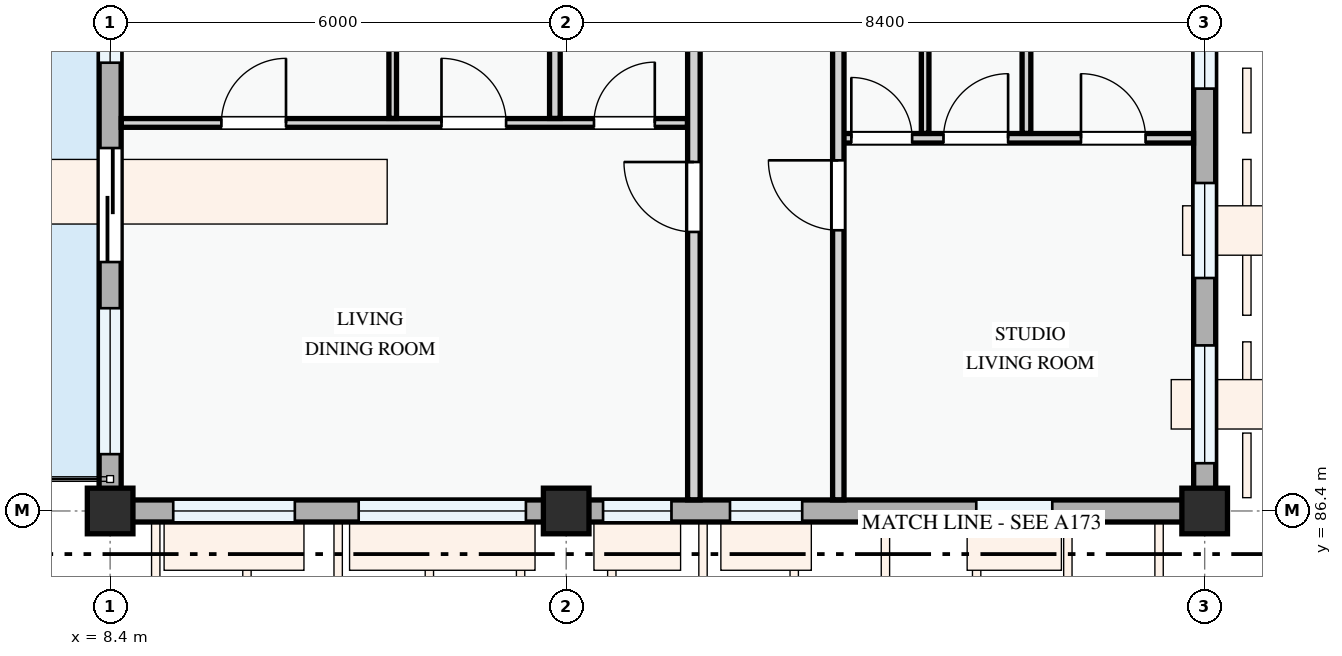
"""IFC4 building model, lengths in metres.
Left out: names, types, materials, properties, quantities, classifications, styles, units other than length and angle.
Written with IfcOpenShell. Run it as: python <this file> out.ifc"""

import sys

from ifc_helpers import new_model, si_unit, direction, frame, frame_2d, origin, origin_2d, place, context, subcontext, project, spatial, rectangle, extrude, element, fill, save


model = new_model("IFC4")
c1 = context("Model", 3, precision=1e-05, world=origin(), true_north=direction((0.0, 1.0)))
c2 = subcontext(c1, "Body", "Model", "MODEL_VIEW")
j1 = project(units=[si_unit("LENGTHUNIT", "METRE"), si_unit("PLANEANGLEUNIT", "RADIAN")], contexts=[c1])
p1 = place(None, origin())
s1 = spatial("IfcSite", under=j1, at=p1, CompositionType="ELEMENT")
p2 = place(p1, origin())
s2 = spatial("IfcBuilding", under=s1, at=p2, CompositionType="ELEMENT")
p3 = place(p2, frame((0.0, 0.0, 27.9)))
s3 = spatial("IfcBuildingStorey", under=s2, at=p3, CompositionType="ELEMENT", Elevation=27.9)
for number, where, z_axis, x_axis in (
    (1, (8.4, 86.4, 0.0), (0.0, 0.0, 1.0), (1.0, 0.0, 0.0)),
    (2, (14.4, 86.4, 0.0), (0.0, 0.0, 1.0), (1.0, 0.0, 0.0)),
    (3, (22.8, 86.4, 0.0), (0.0, 0.0, 1.0), (1.0, 0.0, 0.0)),
):
    element("IfcColumn", number, at=place(p3, frame(where, z_axis=z_axis, x_axis=x_axis)), inside=s3, PredefinedType="COLUMN", context=c2, shape_type="SweptSolid", body=[
        extrude(rectangle(XDim=0.6, YDim=0.6, at=origin_2d()), origin(), (0.0, 0.0, 1.0), 3.3),
    ])
p4 = place(p3, frame((8.4, 94.8, 0.0), z_axis=(0.0, 0.0, 1.0), x_axis=(0.0, -1.0, 0.0)))
e4 = element("IfcWall", 4, at=p4, inside=s3, PredefinedType="STANDARD", context=c2, shape_type="SweptSolid", body=[
    extrude(rectangle(XDim=8.4, YDim=0.29, at=frame_2d((4.2, 0.0))), origin(), (0.0, 0.0, 1.0), 2.345),
])
p5 = place(p4, frame((3.625, 0.0, 0.0)))
e5 = element("IfcOpeningElement", 5, at=p5, cuts=e4, PredefinedType="OPENING", context=c2, shape_type="SweptSolid", body=[
    extrude(rectangle(XDim=1.5, YDim=2.2, at=frame_2d((0.75, 1.1))), frame((0.0, 0.155, 0.0), z_axis=(0.0, -1.0, 0.0), x_axis=(1.0, 0.0, 0.0)), (0.0, 0.0, 1.0), 0.31),
])
p6 = place(p4, frame((0.982, 0.0, 0.78)))
e6 = element("IfcOpeningElement", 6, at=p6, cuts=e4, PredefinedType="OPENING", context=c2, shape_type="SweptSolid", body=[
    extrude(rectangle(XDim=1.52, YDim=1.42, at=frame_2d((0.76, 0.71))), frame((0.0, 0.155, 0.0), z_axis=(0.0, -1.0, 0.0), x_axis=(1.0, 0.0, 0.0)), (0.0, 0.0, 1.0), 0.31),
])
p7 = place(p4, frame((5.732, 0.0, 0.78)))
e7 = element("IfcOpeningElement", 7, at=p7, cuts=e4, PredefinedType="OPENING", context=c2, shape_type="SweptSolid", body=[
    extrude(rectangle(XDim=1.92, YDim=1.44, at=frame_2d((0.96, 0.72))), frame((0.0, 0.155, 0.0), z_axis=(0.0, -1.0, 0.0), x_axis=(1.0, 0.0, 0.0)), (0.0, 0.0, 1.0), 0.31),
])
p8 = place(p3, frame((8.4, 86.4, 0.0), z_axis=(0.0, 0.0, 1.0), x_axis=(1.0, 0.0, 0.0)))
e8 = element("IfcWall", 8, at=p8, inside=s3, PredefinedType="STANDARD", context=c2, shape_type="SweptSolid", body=[
    extrude(rectangle(XDim=6.0, YDim=0.29, at=frame_2d((3.0, 0.0))), origin(), (0.0, 0.0, 1.0), 2.475),
])
p9 = place(p8, frame((0.83, 0.0, 0.78)))
e9 = element("IfcOpeningElement", 9, at=p9, cuts=e8, PredefinedType="OPENING", context=c2, shape_type="SweptSolid", body=[
    extrude(rectangle(XDim=1.6, YDim=1.55, at=frame_2d((0.8, 0.775))), frame((0.0, 0.155, 0.0), z_axis=(0.0, -1.0, 0.0), x_axis=(1.0, 0.0, 0.0)), (0.0, 0.0, 1.0), 0.31),
])
p10 = place(p8, frame((3.27, 0.0, 0.78)))
e10 = element("IfcOpeningElement", 10, at=p10, cuts=e8, PredefinedType="OPENING", context=c2, shape_type="SweptSolid", body=[
    extrude(rectangle(XDim=2.2, YDim=1.5, at=frame_2d((1.1, 0.75))), frame((0.0, 0.155, 0.0), z_axis=(0.0, -1.0, 0.0), x_axis=(1.0, 0.0, 0.0)), (0.0, 0.0, 1.0), 0.31),
])
p11 = place(p3, frame((14.4, 86.4, 0.0), z_axis=(0.0, 0.0, 1.0), x_axis=(1.0, 0.0, 0.0)))
e11 = element("IfcWall", 11, at=p11, inside=s3, PredefinedType="STANDARD", context=c2, shape_type="SweptSolid", body=[
    extrude(rectangle(XDim=8.4, YDim=0.29, at=frame_2d((4.2, 0.0))), origin(), (0.0, 0.0, 1.0), 2.375),
])
p12 = place(p11, frame((0.485, 0.0, 0.78)))
e12 = element("IfcOpeningElement", 12, at=p12, cuts=e11, PredefinedType="OPENING", context=c2, shape_type="SweptSolid", body=[
    extrude(rectangle(XDim=0.9, YDim=1.2, at=frame_2d((0.45, 0.6))), frame((0.0, 0.155, 0.0), z_axis=(0.0, -1.0, 0.0), x_axis=(1.0, 0.0, 0.0)), (0.0, 0.0, 1.0), 0.31),
])
p13 = place(p11, frame((2.155, 0.0, 0.78)))
e13 = element("IfcOpeningElement", 13, at=p13, cuts=e11, PredefinedType="OPENING", context=c2, shape_type="SweptSolid", body=[
    extrude(rectangle(XDim=0.95, YDim=1.15, at=frame_2d((0.475, 0.575))), frame((0.0, 0.155, 0.0), z_axis=(0.0, -1.0, 0.0), x_axis=(1.0, 0.0, 0.0)), (0.0, 0.0, 1.0), 0.31),
])
p14 = place(p11, frame((5.395, 0.0, 0.78)))
e14 = element("IfcOpeningElement", 14, at=p14, cuts=e11, PredefinedType="OPENING", context=c2, shape_type="SweptSolid", body=[
    extrude(rectangle(XDim=1.0, YDim=1.25, at=frame_2d((0.5, 0.625))), frame((0.0, 0.155, 0.0), z_axis=(0.0, -1.0, 0.0), x_axis=(1.0, 0.0, 0.0)), (0.0, 0.0, 1.0), 0.31),
])
p15 = place(p3, frame((22.8, 86.4, 0.0), z_axis=(0.0, 0.0, 1.0), x_axis=(0.0, 1.0, 0.0)))
e15 = element("IfcWall", 15, at=p15, inside=s3, PredefinedType="STANDARD", context=c2, shape_type="SweptSolid", body=[
    extrude(rectangle(XDim=8.4, YDim=0.29, at=frame_2d((4.2, 0.0))), origin(), (0.0, 0.0, 1.0), 2.425),
])
p16 = place(p15, frame((0.628, 0.0, 0.78)))
e16 = element("IfcOpeningElement", 16, at=p16, cuts=e15, PredefinedType="OPENING", context=c2, shape_type="SweptSolid", body=[
    extrude(rectangle(XDim=1.55, YDim=1.4, at=frame_2d((0.775, 0.7))), frame((0.0, 0.155, 0.0), z_axis=(0.0, -1.0, 0.0), x_axis=(1.0, 0.0, 0.0)), (0.0, 0.0, 1.0), 0.31),
])
p17 = place(p15, frame((3.065, 0.0, 0.78)))
e17 = element("IfcOpeningElement", 17, at=p17, cuts=e15, PredefinedType="OPENING", context=c2, shape_type="SweptSolid", body=[
    extrude(rectangle(XDim=1.25, YDim=1.3, at=frame_2d((0.625, 0.65))), frame((0.0, 0.155, 0.0), z_axis=(0.0, -1.0, 0.0), x_axis=(1.0, 0.0, 0.0)), (0.0, 0.0, 1.0), 0.31),
])
p18 = place(p15, frame((5.557, 0.0, 0.78)))
e18 = element("IfcOpeningElement", 18, at=p18, cuts=e15, PredefinedType="OPENING", context=c2, shape_type="SweptSolid", body=[
    extrude(rectangle(XDim=2.0, YDim=1.5, at=frame_2d((1.0, 0.75))), frame((0.0, 0.155, 0.0), z_axis=(0.0, -1.0, 0.0), x_axis=(1.0, 0.0, 0.0)), (0.0, 0.0, 1.0), 0.31),
])
p19 = place(p3, frame((8.547, 91.505, 0.0), z_axis=(0.0, 0.0, 1.0), x_axis=(1.0, 0.0, 0.0)))
e19 = element("IfcWall", 19, at=p19, inside=s3, PredefinedType="PARTITIONING", context=c2, shape_type="SweptSolid", body=[
    extrude(rectangle(XDim=7.448, YDim=0.115, at=frame_2d((3.724, 0.0))), origin(), (0.0, 0.0, 1.0), 3.0),
])
p20 = place(p19, frame((1.317, 0.0, 0.0)))
e20 = element("IfcOpeningElement", 20, at=p20, cuts=e19, PredefinedType="OPENING", context=c2, shape_type="SweptSolid", body=[
    extrude(rectangle(XDim=0.85, YDim=2.1, at=frame_2d((0.425, 1.05))), frame((0.0, 0.067, 0.0), z_axis=(0.0, -1.0, 0.0), x_axis=(1.0, 0.0, 0.0)), (0.0, 0.0, 1.0), 0.135),
])
p21 = place(p19, frame((4.212, 0.0, 0.0)))
e21 = element("IfcOpeningElement", 21, at=p21, cuts=e19, PredefinedType="OPENING", context=c2, shape_type="SweptSolid", body=[
    extrude(rectangle(XDim=0.85, YDim=2.1, at=frame_2d((0.425, 1.05))), frame((0.0, 0.067, 0.0), z_axis=(0.0, -1.0, 0.0), x_axis=(1.0, 0.0, 0.0)), (0.0, 0.0, 1.0), 0.135),
])
p22 = place(p19, frame((6.219, 0.0, 0.0)))
e22 = element("IfcOpeningElement", 22, at=p22, cuts=e19, PredefinedType="OPENING", context=c2, shape_type="SweptSolid", body=[
    extrude(rectangle(XDim=0.8, YDim=2.1, at=frame_2d((0.4, 1.05))), frame((0.0, 0.067, 0.0), z_axis=(0.0, -1.0, 0.0), x_axis=(1.0, 0.0, 0.0)), (0.0, 0.0, 1.0), 0.135),
])
p23 = place(p3, frame((12.118, 91.564, 0.0), z_axis=(0.0, 0.0, 1.0), x_axis=(0.0, 1.0, 0.0)))
e23 = element("IfcWall", 23, at=p23, inside=s3, PredefinedType="PARTITIONING", context=c2, shape_type="SweptSolid", body=[
    extrude(rectangle(XDim=4.891, YDim=0.1, at=frame_2d((2.446, 0.0))), origin(), (0.0, 0.0, 1.0), 3.0),
])
p24 = place(p3, frame((14.251, 91.564, 0.0), z_axis=(0.0, 0.0, 1.0), x_axis=(0.0, 1.0, 0.0)))
e24 = element("IfcWall", 24, at=p24, inside=s3, PredefinedType="PARTITIONING", context=c2, shape_type="SweptSolid", body=[
    extrude(rectangle(XDim=4.891, YDim=0.14, at=frame_2d((2.446, 0.0))), origin(), (0.0, 0.0, 1.0), 2.425),
])
p25 = place(p3, frame((17.98, 91.303, 0.0), z_axis=(0.0, 0.0, 1.0), x_axis=(1.0, 0.0, 0.0)))
e25 = element("IfcWall", 25, at=p25, inside=s3, PredefinedType="PARTITIONING", context=c2, shape_type="SweptSolid", body=[
    extrude(rectangle(XDim=4.673, YDim=0.125, at=frame_2d((2.336, 0.0))), origin(), (0.0, 0.0, 1.0), 3.0),
])
p26 = place(p25, frame((0.171, 0.0, 0.0)))
e26 = element("IfcOpeningElement", 26, at=p26, cuts=e25, PredefinedType="OPENING", context=c2, shape_type="SweptSolid", body=[
    extrude(rectangle(XDim=0.8, YDim=2.1, at=frame_2d((0.4, 1.05))), frame((0.0, 0.073, 0.0), z_axis=(0.0, -1.0, 0.0), x_axis=(1.0, 0.0, 0.0)), (0.0, 0.0, 1.0), 0.145),
])
p27 = place(p25, frame((1.384, 0.0, 0.0)))
e27 = element("IfcOpeningElement", 27, at=p27, cuts=e25, PredefinedType="OPENING", context=c2, shape_type="SweptSolid", body=[
    extrude(rectangle(XDim=0.85, YDim=2.1, at=frame_2d((0.425, 1.05))), frame((0.0, 0.073, 0.0), z_axis=(0.0, -1.0, 0.0), x_axis=(1.0, 0.0, 0.0)), (0.0, 0.0, 1.0), 0.145),
])
p28 = place(p25, frame((3.193, 0.0, 0.0)))
e28 = element("IfcOpeningElement", 28, at=p28, cuts=e25, PredefinedType="OPENING", context=c2, shape_type="SweptSolid", body=[
    extrude(rectangle(XDim=0.85, YDim=2.1, at=frame_2d((0.425, 1.05))), frame((0.0, 0.073, 0.0), z_axis=(0.0, -1.0, 0.0), x_axis=(1.0, 0.0, 0.0)), (0.0, 0.0, 1.0), 0.145),
])
p29 = place(p3, frame((20.455, 91.368, 0.0), z_axis=(0.0, 0.0, 1.0), x_axis=(0.0, 1.0, 0.0)))
e29 = element("IfcWall", 29, at=p29, inside=s3, PredefinedType="PARTITIONING", context=c2, shape_type="SweptSolid", body=[
    extrude(rectangle(XDim=5.08, YDim=0.115, at=frame_2d((2.54, 0.0))), origin(), (0.0, 0.0, 1.0), 3.0),
])
p30 = place(p3, frame((19.122, 91.368, 0.0), z_axis=(0.0, 0.0, 1.0), x_axis=(0.0, 1.0, 0.0)))
e30 = element("IfcWall", 30, at=p30, inside=s3, PredefinedType="PARTITIONING", context=c2, shape_type="SweptSolid", body=[
    extrude(rectangle(XDim=5.08, YDim=0.1, at=frame_2d((2.54, 0.0))), origin(), (0.0, 0.0, 1.0), 3.0),
])
p31 = place(p3, frame((16.08, 86.547, 0.0), z_axis=(0.0, 0.0, 1.0), x_axis=(0.0, 1.0, 0.0)))
e31 = element("IfcWall", 31, at=p31, inside=s3, PredefinedType="PARTITIONING", context=c2, shape_type="SweptSolid", body=[
    extrude(rectangle(XDim=22.793, YDim=0.165, at=frame_2d((11.396, 0.0))), origin(), (0.0, 0.0, 1.0), 3.0),
])
p32 = place(p31, frame((3.524, 0.0, 0.0)))
e32 = element("IfcOpeningElement", 32, at=p32, cuts=e31, PredefinedType="OPENING", context=c2, shape_type="SweptSolid", body=[
    extrude(rectangle(XDim=0.92, YDim=2.1, at=frame_2d((0.46, 1.05))), frame((0.0, 0.093, 0.0), z_axis=(0.0, -1.0, 0.0), x_axis=(1.0, 0.0, 0.0)), (0.0, 0.0, 1.0), 0.185),
])
p33 = place(p31, frame((10.716, 0.0, 0.0)))
e33 = element("IfcOpeningElement", 33, at=p33, cuts=e31, PredefinedType="OPENING", context=c2, shape_type="SweptSolid", body=[
    extrude(rectangle(XDim=0.92, YDim=2.1, at=frame_2d((0.46, 1.05))), frame((0.0, 0.093, 0.0), z_axis=(0.0, -1.0, 0.0), x_axis=(1.0, 0.0, 0.0)), (0.0, 0.0, 1.0), 0.185),
])
p34 = place(p3, frame((17.98, 86.547, 0.0), z_axis=(0.0, 0.0, 1.0), x_axis=(0.0, 1.0, 0.0)))
e34 = element("IfcWall", 34, at=p34, inside=s3, PredefinedType="PARTITIONING", context=c2, shape_type="SweptSolid", body=[
    extrude(rectangle(XDim=22.793, YDim=0.15, at=frame_2d((11.396, 0.0))), origin(), (0.0, 0.0, 1.0), 3.0),
])
p35 = place(p34, frame((3.546, 0.0, 0.0)))
e35 = element("IfcOpeningElement", 35, at=p35, cuts=e34, PredefinedType="OPENING", context=c2, shape_type="SweptSolid", body=[
    extrude(rectangle(XDim=0.92, YDim=2.1, at=frame_2d((0.46, 1.05))), frame((0.0, 0.085, 0.0), z_axis=(0.0, -1.0, 0.0), x_axis=(1.0, 0.0, 0.0)), (0.0, 0.0, 1.0), 0.17),
])
p36 = place(p34, frame((10.838, 0.0, 0.0)))
e36 = element("IfcOpeningElement", 36, at=p36, cuts=e34, PredefinedType="OPENING", context=c2, shape_type="SweptSolid", body=[
    extrude(rectangle(XDim=0.92, YDim=2.1, at=frame_2d((0.46, 1.05))), frame((0.0, 0.085, 0.0), z_axis=(0.0, -1.0, 0.0), x_axis=(1.0, 0.0, 0.0)), (0.0, 0.0, 1.0), 0.17),
])
p37 = place(p5, frame((1.5, 0.0, 0.0), z_axis=(0.0, 0.0, 1.0), x_axis=(-1.0, 0.0, 0.0)))
e37 = element("IfcDoor", 37, at=p37, inside=s3, OperationType="SLIDING_TO_RIGHT", PredefinedType="DOOR", context=c2, shape_type="SweptSolid", body=[
    extrude(rectangle(XDim=1.5, YDim=2.2, at=frame_2d((0.75, 1.1))), frame((0.0, 0.025, 0.0), z_axis=(0.0, -1.0, 0.0), x_axis=(1.0, 0.0, 0.0)), (0.0, 0.0, 1.0), 0.05),
])
fill(e5, e37)
p38 = place(p6, origin())
e38 = element("IfcWindow", 38, at=p38, inside=s3, PartitioningType="SINGLE_PANEL", PredefinedType="WINDOW", context=c2, shape_type="SweptSolid", body=[
    extrude(rectangle(XDim=1.52, YDim=1.42, at=frame_2d((0.76, 0.71))), frame((0.0, 0.03, 0.0), z_axis=(0.0, -1.0, 0.0), x_axis=(1.0, 0.0, 0.0)), (0.0, 0.0, 1.0), 0.06),
])
fill(e6, e38)
p39 = place(p7, origin())
e39 = element("IfcWindow", 39, at=p39, inside=s3, PartitioningType="DOUBLE_PANEL_VERTICAL", PredefinedType="WINDOW", context=c2, shape_type="SweptSolid", body=[
    extrude(rectangle(XDim=1.92, YDim=1.44, at=frame_2d((0.96, 0.72))), frame((0.0, 0.03, 0.0), z_axis=(0.0, -1.0, 0.0), x_axis=(1.0, 0.0, 0.0)), (0.0, 0.0, 1.0), 0.06),
])
fill(e7, e39)
p40 = place(p9, origin())
e40 = element("IfcWindow", 40, at=p40, inside=s3, PartitioningType="DOUBLE_PANEL_VERTICAL", PredefinedType="WINDOW", context=c2, shape_type="SweptSolid", body=[
    extrude(rectangle(XDim=1.6, YDim=1.55, at=frame_2d((0.8, 0.775))), frame((0.0, 0.03, 0.0), z_axis=(0.0, -1.0, 0.0), x_axis=(1.0, 0.0, 0.0)), (0.0, 0.0, 1.0), 0.06),
])
fill(e9, e40)
p41 = place(p10, origin())
e41 = element("IfcWindow", 41, at=p41, inside=s3, PartitioningType="DOUBLE_PANEL_VERTICAL", PredefinedType="WINDOW", context=c2, shape_type="SweptSolid", body=[
    extrude(rectangle(XDim=2.2, YDim=1.5, at=frame_2d((1.1, 0.75))), frame((0.0, 0.03, 0.0), z_axis=(0.0, -1.0, 0.0), x_axis=(1.0, 0.0, 0.0)), (0.0, 0.0, 1.0), 0.06),
])
fill(e10, e41)
p42 = place(p12, origin())
e42 = element("IfcWindow", 42, at=p42, inside=s3, PartitioningType="SINGLE_PANEL", PredefinedType="WINDOW", context=c2, shape_type="SweptSolid", body=[
    extrude(rectangle(XDim=0.9, YDim=1.2, at=frame_2d((0.45, 0.6))), frame((0.0, 0.03, 0.0), z_axis=(0.0, -1.0, 0.0), x_axis=(1.0, 0.0, 0.0)), (0.0, 0.0, 1.0), 0.06),
])
fill(e12, e42)
p43 = place(p13, origin())
e43 = element("IfcWindow", 43, at=p43, inside=s3, PartitioningType="SINGLE_PANEL", PredefinedType="WINDOW", context=c2, shape_type="SweptSolid", body=[
    extrude(rectangle(XDim=0.95, YDim=1.15, at=frame_2d((0.475, 0.575))), frame((0.0, 0.03, 0.0), z_axis=(0.0, -1.0, 0.0), x_axis=(1.0, 0.0, 0.0)), (0.0, 0.0, 1.0), 0.06),
])
fill(e13, e43)
p44 = place(p14, origin())
e44 = element("IfcWindow", 44, at=p44, inside=s3, PartitioningType="SINGLE_PANEL", PredefinedType="WINDOW", context=c2, shape_type="SweptSolid", body=[
    extrude(rectangle(XDim=1.0, YDim=1.25, at=frame_2d((0.5, 0.625))), frame((0.0, 0.03, 0.0), z_axis=(0.0, -1.0, 0.0), x_axis=(1.0, 0.0, 0.0)), (0.0, 0.0, 1.0), 0.06),
])
fill(e14, e44)
p45 = place(p16, origin())
e45 = element("IfcWindow", 45, at=p45, inside=s3, PartitioningType="SINGLE_PANEL", PredefinedType="WINDOW", context=c2, shape_type="SweptSolid", body=[
    extrude(rectangle(XDim=1.55, YDim=1.4, at=frame_2d((0.775, 0.7))), frame((0.0, 0.03, 0.0), z_axis=(0.0, -1.0, 0.0), x_axis=(1.0, 0.0, 0.0)), (0.0, 0.0, 1.0), 0.06),
])
fill(e16, e45)
p46 = place(p17, origin())
e46 = element("IfcWindow", 46, at=p46, inside=s3, PartitioningType="SINGLE_PANEL", PredefinedType="WINDOW", context=c2, shape_type="SweptSolid", body=[
    extrude(rectangle(XDim=1.25, YDim=1.3, at=frame_2d((0.625, 0.65))), frame((0.0, 0.03, 0.0), z_axis=(0.0, -1.0, 0.0), x_axis=(1.0, 0.0, 0.0)), (0.0, 0.0, 1.0), 0.06),
])
fill(e17, e46)
p47 = place(p18, origin())
e47 = element("IfcWindow", 47, at=p47, inside=s3, PartitioningType="DOUBLE_PANEL_VERTICAL", PredefinedType="WINDOW", context=c2, shape_type="SweptSolid", body=[
    extrude(rectangle(XDim=2.0, YDim=1.5, at=frame_2d((1.0, 0.75))), frame((0.0, 0.03, 0.0), z_axis=(0.0, -1.0, 0.0), x_axis=(1.0, 0.0, 0.0)), (0.0, 0.0, 1.0), 0.06),
])
fill(e18, e47)
p48 = place(p20, origin())
e48 = element("IfcDoor", 48, at=p48, inside=s3, OperationType="SINGLE_SWING_RIGHT", PredefinedType="DOOR", context=c2, shape_type="SweptSolid", body=[
    extrude(rectangle(XDim=0.85, YDim=2.1, at=frame_2d((0.425, 1.05))), frame((0.0, 0.025, 0.0), z_axis=(0.0, -1.0, 0.0), x_axis=(1.0, 0.0, 0.0)), (0.0, 0.0, 1.0), 0.05),
])
fill(e20, e48)
p49 = place(p21, origin())
e49 = element("IfcDoor", 49, at=p49, inside=s3, OperationType="SINGLE_SWING_LEFT", PredefinedType="DOOR", context=c2, shape_type="SweptSolid", body=[
    extrude(rectangle(XDim=0.85, YDim=2.1, at=frame_2d((0.425, 1.05))), frame((0.0, 0.025, 0.0), z_axis=(0.0, -1.0, 0.0), x_axis=(1.0, 0.0, 0.0)), (0.0, 0.0, 1.0), 0.05),
])
fill(e21, e49)
p50 = place(p22, origin())
e50 = element("IfcDoor", 50, at=p50, inside=s3, OperationType="SINGLE_SWING_RIGHT", PredefinedType="DOOR", context=c2, shape_type="SweptSolid", body=[
    extrude(rectangle(XDim=0.8, YDim=2.1, at=frame_2d((0.4, 1.05))), frame((0.0, 0.025, 0.0), z_axis=(0.0, -1.0, 0.0), x_axis=(1.0, 0.0, 0.0)), (0.0, 0.0, 1.0), 0.05),
])
fill(e22, e50)
p51 = place(p26, origin())
e51 = element("IfcDoor", 51, at=p51, inside=s3, OperationType="SINGLE_SWING_LEFT", PredefinedType="DOOR", context=c2, shape_type="SweptSolid", body=[
    extrude(rectangle(XDim=0.8, YDim=2.1, at=frame_2d((0.4, 1.05))), frame((0.0, 0.025, 0.0), z_axis=(0.0, -1.0, 0.0), x_axis=(1.0, 0.0, 0.0)), (0.0, 0.0, 1.0), 0.05),
])
fill(e26, e51)
p52 = place(p27, origin())
e52 = element("IfcDoor", 52, at=p52, inside=s3, OperationType="SINGLE_SWING_RIGHT", PredefinedType="DOOR", context=c2, shape_type="SweptSolid", body=[
    extrude(rectangle(XDim=0.85, YDim=2.1, at=frame_2d((0.425, 1.05))), frame((0.0, 0.025, 0.0), z_axis=(0.0, -1.0, 0.0), x_axis=(1.0, 0.0, 0.0)), (0.0, 0.0, 1.0), 0.05),
])
fill(e27, e52)
p53 = place(p28, origin())
e53 = element("IfcDoor", 53, at=p53, inside=s3, OperationType="SINGLE_SWING_LEFT", PredefinedType="DOOR", context=c2, shape_type="SweptSolid", body=[
    extrude(rectangle(XDim=0.85, YDim=2.1, at=frame_2d((0.425, 1.05))), frame((0.0, 0.025, 0.0), z_axis=(0.0, -1.0, 0.0), x_axis=(1.0, 0.0, 0.0)), (0.0, 0.0, 1.0), 0.05),
])
fill(e28, e53)
p54 = place(p32, origin())
e54 = element("IfcDoor", 54, at=p54, inside=s3, OperationType="SINGLE_SWING_RIGHT", PredefinedType="DOOR", context=c2, shape_type="SweptSolid", body=[
    extrude(rectangle(XDim=0.92, YDim=2.1, at=frame_2d((0.46, 1.05))), frame((0.0, 0.025, 0.0), z_axis=(0.0, -1.0, 0.0), x_axis=(1.0, 0.0, 0.0)), (0.0, 0.0, 1.0), 0.05),
])
fill(e32, e54)
p55 = place(p35, origin())
e55 = element("IfcDoor", 55, at=p55, inside=s3, OperationType="SINGLE_SWING_RIGHT", PredefinedType="DOOR", context=c2, shape_type="SweptSolid", body=[
    extrude(rectangle(XDim=0.92, YDim=2.1, at=frame_2d((0.46, 1.05))), frame((0.0, 0.025, 0.0), z_axis=(0.0, -1.0, 0.0), x_axis=(1.0, 0.0, 0.0)), (0.0, 0.0, 1.0), 0.05),
])
fill(e35, e55)
save(model, sys.argv[1])
